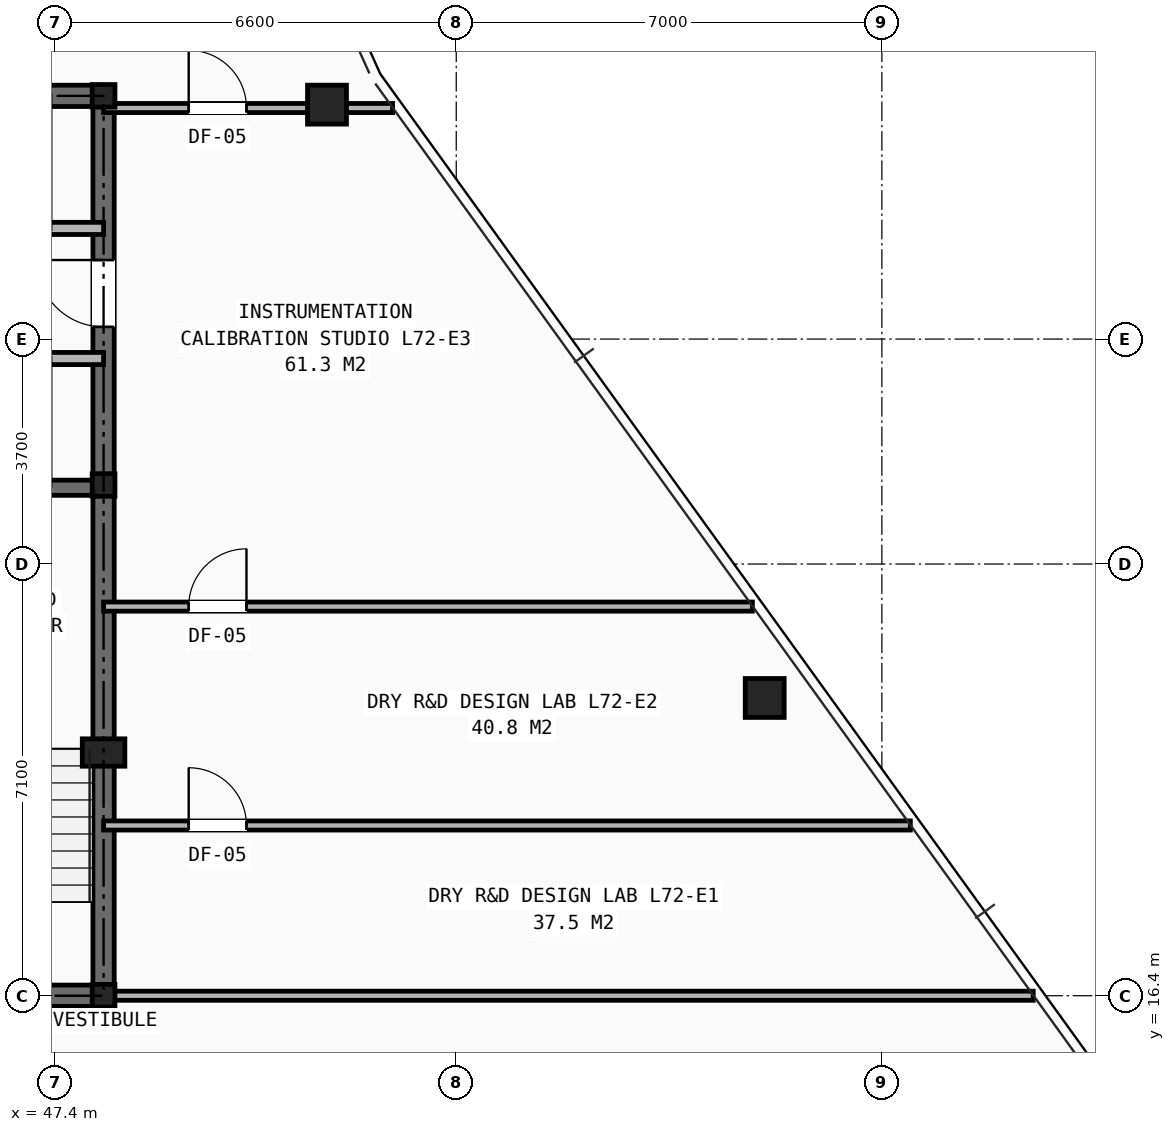
"""IFC4 building model, lengths in metres.
Left out: names, types, materials, properties, quantities, classifications, styles, units other than length and angle.
Written with IfcOpenShell. Run it as: python <this file> out.ifc"""

import sys

from ifc_helpers import new_model, si_unit, direction, frame, frame_2d, origin, origin_2d, place, context, subcontext, project, spatial, rectangle, hollow_rectangle, i_section, extrude, element, fill, save


model = new_model("IFC4")
c1 = context("Model", 3, precision=1e-05, world=origin(), true_north=direction((0.0, 1.0)))
c2 = subcontext(c1, "Body", "Model", "MODEL_VIEW")
j1 = project(units=[si_unit("LENGTHUNIT", "METRE"), si_unit("PLANEANGLEUNIT", "RADIAN")], contexts=[c1])
p1 = place(None, origin())
s1 = spatial("IfcSite", under=j1, at=p1, CompositionType="ELEMENT")
p2 = place(p1, origin())
s2 = spatial("IfcBuilding", under=s1, at=p2, CompositionType="ELEMENT")
p3 = place(p2, frame((0.0, 0.0, 255.0)))
s3 = spatial("IfcBuildingStorey", under=s2, at=p3, CompositionType="ELEMENT", Elevation=255.0)
for number, where, z_axis, x_axis in (
    (1, (48.2, 16.4, 0.0), (0.0, 0.0, 1.0), (1.0, 0.0, 0.0)),
    (2, (48.2, 24.8, 0.0), (0.0, 0.0, 1.0), (1.0, 0.0, 0.0)),
    (3, (48.2, 31.2, 0.0), (0.0, 0.0, 1.0), (1.0, 0.0, 0.0)),
):
    element("IfcColumn", number, at=place(p3, frame(where, z_axis=z_axis, x_axis=x_axis)), inside=s3, PredefinedType="COLUMN", context=c2, shape_type="SweptSolid", body=[
        extrude(i_section(OverallWidth=0.374, OverallDepth=0.372, WebThickness=0.016, FlangeThickness=0.026, at=origin_2d()), origin(), (0.0, 0.0, 1.0), 3.5),
    ])
p4 = place(p3, frame((48.2, 20.4, 0.0), z_axis=(0.0, 0.0, 1.0), x_axis=(1.0, 0.0, 0.0)))
e4 = element("IfcColumn", 4, at=p4, inside=s3, PredefinedType="PILASTER", context=c2, shape_type="SweptSolid", body=[
    extrude(rectangle(XDim=0.7, YDim=0.45, at=origin_2d()), origin(), (0.0, 0.0, 1.0), 3.5),
])
for number, where, z_axis, x_axis in (
    (5, (59.073, 21.297, 0.0), (0.0, 0.0, 1.0), (1.0, 0.0, 0.0)),
    (6, (51.874, 31.056, 0.0), (0.0, 0.0, 1.0), (1.0, 0.0, 0.0)),
):
    element("IfcColumn", number, at=place(p3, frame(where, z_axis=z_axis, x_axis=x_axis)), inside=s3, PredefinedType="COLUMN", context=c2, shape_type="SweptSolid", body=[
        extrude(hollow_rectangle(XDim=0.64, YDim=0.64, WallThickness=0.045, at=origin_2d()), origin(), (0.0, 0.0, 1.0), 3.5),
    ])
p5 = place(p3, frame((31.8, 16.4, 0.0), z_axis=(0.0, 0.0, 1.0), x_axis=(1.0, 0.0, 0.0)))
e7 = element("IfcWall", 7, at=p5, inside=s3, PredefinedType="SHEAR", context=c2, shape_type="SweptSolid", body=[
    extrude(rectangle(XDim=16.4, YDim=0.35, at=frame_2d((8.2, 0.0))), origin(), (0.0, 0.0, 1.0), 3.25),
])
p6 = place(p5, frame((7.75, 0.0, 0.0)))
e8 = element("IfcOpeningElement", 8, at=p6, cuts=e7, PredefinedType="OPENING", context=c2, shape_type="SweptSolid", body=[
    extrude(rectangle(XDim=0.9, YDim=2.1, at=frame_2d((0.45, 1.05))), frame((0.0, 0.185, 0.0), z_axis=(0.0, -1.0, 0.0), x_axis=(1.0, 0.0, 0.0)), (0.0, 0.0, 1.0), 0.37),
])
p7 = place(p5, frame((4.2, 0.0, 0.0)))
e9 = element("IfcOpeningElement", 9, at=p7, cuts=e7, PredefinedType="OPENING", context=c2, shape_type="SweptSolid", body=[
    extrude(rectangle(XDim=0.95, YDim=2.1, at=frame_2d((0.475, 1.05))), frame((0.0, 0.185, 0.0), z_axis=(0.0, -1.0, 0.0), x_axis=(1.0, 0.0, 0.0)), (0.0, 0.0, 1.0), 0.37),
])
p8 = place(p5, frame((10.6, 0.0, 0.0)))
e10 = element("IfcOpeningElement", 10, at=p8, cuts=e7, PredefinedType="OPENING", context=c2, shape_type="SweptSolid", body=[
    extrude(rectangle(XDim=0.95, YDim=2.1, at=frame_2d((0.475, 1.05))), frame((0.0, 0.185, 0.0), z_axis=(0.0, -1.0, 0.0), x_axis=(1.0, 0.0, 0.0)), (0.0, 0.0, 1.0), 0.37),
])
p9 = place(p3, frame((31.8, 31.2, 0.0), z_axis=(0.0, 0.0, 1.0), x_axis=(1.0, 0.0, 0.0)))
e11 = element("IfcWall", 11, at=p9, inside=s3, PredefinedType="SHEAR", context=c2, shape_type="SweptSolid", body=[
    extrude(rectangle(XDim=16.4, YDim=0.35, at=frame_2d((8.2, 0.0))), origin(), (0.0, 0.0, 1.0), 3.25),
])
p10 = place(p3, frame((48.2, 16.4, 0.0), z_axis=(0.0, 0.0, 1.0), x_axis=(0.0, 1.0, 0.0)))
e12 = element("IfcWall", 12, at=p10, inside=s3, PredefinedType="SHEAR", context=c2, shape_type="SweptSolid", body=[
    extrude(rectangle(XDim=14.8, YDim=0.35, at=frame_2d((7.4, 0.0))), origin(), (0.0, 0.0, 1.0), 3.25),
])
p11 = place(p10, frame((11.0, 0.0, 0.0)))
e13 = element("IfcOpeningElement", 13, at=p11, cuts=e12, PredefinedType="OPENING", context=c2, shape_type="SweptSolid", body=[
    extrude(rectangle(XDim=1.1, YDim=2.15, at=frame_2d((0.55, 1.075))), frame((0.0, 0.185, 0.0), z_axis=(0.0, -1.0, 0.0), x_axis=(1.0, 0.0, 0.0)), (0.0, 0.0, 1.0), 0.37),
])
p12 = place(p3, frame((44.955, 24.755, 0.0), z_axis=(0.0, 0.0, 1.0), x_axis=(1.0, 0.0, 0.0)))
e14 = element("IfcWall", 14, at=p12, inside=s3, PredefinedType="SHEAR", context=c2, shape_type="SweptSolid", body=[
    extrude(rectangle(XDim=3.245, YDim=0.25, at=frame_2d((1.623, 0.0))), origin(), (0.0, 0.0, 1.0), 3.25),
])
p13 = place(p3, frame((31.8, 29.02, 0.0), z_axis=(0.0, 0.0, 1.0), x_axis=(1.0, 0.0, 0.0)))
e15 = element("IfcWall", 15, at=p13, inside=s3, PredefinedType="SOLIDWALL", context=c2, shape_type="SweptSolid", body=[
    extrude(rectangle(XDim=16.4, YDim=0.2, at=frame_2d((8.2, 0.0))), origin(), (0.0, 0.0, 1.0), 2.705),
])
p14 = place(p13, frame((0.55, 0.0, 0.0)))
e16 = element("IfcOpeningElement", 16, at=p14, cuts=e15, PredefinedType="OPENING", context=c2, shape_type="SweptSolid", body=[
    extrude(rectangle(XDim=0.85, YDim=2.05, at=frame_2d((0.425, 1.025))), frame((0.0, 0.11, 0.0), z_axis=(0.0, -1.0, 0.0), x_axis=(1.0, 0.0, 0.0)), (0.0, 0.0, 1.0), 0.22),
])
p15 = place(p13, frame((5.94, 0.0, 0.0)))
e17 = element("IfcOpeningElement", 17, at=p15, cuts=e15, PredefinedType="OPENING", context=c2, shape_type="SweptSolid", body=[
    extrude(rectangle(XDim=0.9, YDim=2.1, at=frame_2d((0.45, 1.05))), frame((0.0, 0.11, 0.0), z_axis=(0.0, -1.0, 0.0), x_axis=(1.0, 0.0, 0.0)), (0.0, 0.0, 1.0), 0.22),
])
p16 = place(p13, frame((11.41, 0.0, 0.0)))
e18 = element("IfcOpeningElement", 18, at=p16, cuts=e15, PredefinedType="OPENING", context=c2, shape_type="SweptSolid", body=[
    extrude(rectangle(XDim=1.1, YDim=2.15, at=frame_2d((0.55, 1.075))), frame((0.0, 0.11, 0.0), z_axis=(0.0, -1.0, 0.0), x_axis=(1.0, 0.0, 0.0)), (0.0, 0.0, 1.0), 0.22),
])
p17 = place(p13, frame((13.73, 0.0, 0.0)))
e19 = element("IfcOpeningElement", 19, at=p17, cuts=e15, PredefinedType="OPENING", context=c2, shape_type="SweptSolid", body=[
    extrude(rectangle(XDim=1.1, YDim=2.15, at=frame_2d((0.55, 1.075))), frame((0.0, 0.11, 0.0), z_axis=(0.0, -1.0, 0.0), x_axis=(1.0, 0.0, 0.0)), (0.0, 0.0, 1.0), 0.22),
])
p18 = place(p3, frame((31.8, 26.88, 0.0), z_axis=(0.0, 0.0, 1.0), x_axis=(1.0, 0.0, 0.0)))
e20 = element("IfcWall", 20, at=p18, inside=s3, PredefinedType="SOLIDWALL", context=c2, shape_type="SweptSolid", body=[
    extrude(rectangle(XDim=16.4, YDim=0.2, at=frame_2d((8.2, 0.0))), origin(), (0.0, 0.0, 1.0), 2.705),
])
p19 = place(p18, frame((0.55, 0.0, 0.0)))
e21 = element("IfcOpeningElement", 21, at=p19, cuts=e20, PredefinedType="OPENING", context=c2, shape_type="SweptSolid", body=[
    extrude(rectangle(XDim=0.85, YDim=2.05, at=frame_2d((0.425, 1.025))), frame((0.0, 0.11, 0.0), z_axis=(0.0, -1.0, 0.0), x_axis=(1.0, 0.0, 0.0)), (0.0, 0.0, 1.0), 0.22),
])
p20 = place(p18, frame((5.94, 0.0, 0.0)))
e22 = element("IfcOpeningElement", 22, at=p20, cuts=e20, PredefinedType="OPENING", context=c2, shape_type="SweptSolid", body=[
    extrude(rectangle(XDim=0.9, YDim=2.1, at=frame_2d((0.45, 1.05))), frame((0.0, 0.11, 0.0), z_axis=(0.0, -1.0, 0.0), x_axis=(1.0, 0.0, 0.0)), (0.0, 0.0, 1.0), 0.22),
])
p21 = place(p18, frame((11.41, 0.0, 0.0)))
e23 = element("IfcOpeningElement", 23, at=p21, cuts=e20, PredefinedType="OPENING", context=c2, shape_type="SweptSolid", body=[
    extrude(rectangle(XDim=1.1, YDim=2.15, at=frame_2d((0.55, 1.075))), frame((0.0, 0.11, 0.0), z_axis=(0.0, -1.0, 0.0), x_axis=(1.0, 0.0, 0.0)), (0.0, 0.0, 1.0), 0.22),
])
p22 = place(p18, frame((13.73, 0.0, 0.0)))
e24 = element("IfcOpeningElement", 24, at=p22, cuts=e20, PredefinedType="OPENING", context=c2, shape_type="SweptSolid", body=[
    extrude(rectangle(XDim=1.1, YDim=2.15, at=frame_2d((0.55, 1.075))), frame((0.0, 0.11, 0.0), z_axis=(0.0, -1.0, 0.0), x_axis=(1.0, 0.0, 0.0)), (0.0, 0.0, 1.0), 0.22),
])
p23 = place(p3, frame((48.2, 16.4, 0.0), z_axis=(0.0, 0.0, 1.0), x_axis=(1.0, 0.0, 0.0)))
e25 = element("IfcWall", 25, at=p23, inside=s3, PredefinedType="PARTITIONING", context=c2, shape_type="SweptSolid", body=[
    extrude(rectangle(XDim=15.289, YDim=0.15, at=frame_2d((7.644, 0.0))), origin(), (0.0, 0.0, 1.0), 2.292),
])
p24 = place(p3, frame((48.2, 19.2, 0.0), z_axis=(0.0, 0.0, 1.0), x_axis=(1.0, 0.0, 0.0)))
e26 = element("IfcWall", 26, at=p24, inside=s3, PredefinedType="PARTITIONING", context=c2, shape_type="SweptSolid", body=[
    extrude(rectangle(XDim=13.268, YDim=0.15, at=frame_2d((6.634, 0.0))), origin(), (0.0, 0.0, 1.0), 2.292),
])
p25 = place(p24, frame((1.4, 0.0, 0.0)))
e27 = element("IfcOpeningElement", 27, at=p25, cuts=e26, PredefinedType="OPENING", context=c2, shape_type="SweptSolid", body=[
    extrude(rectangle(XDim=0.95, YDim=2.1, at=frame_2d((0.475, 1.05))), frame((0.0, 0.085, 0.0), z_axis=(0.0, -1.0, 0.0), x_axis=(1.0, 0.0, 0.0)), (0.0, 0.0, 1.0), 0.17),
])
p26 = place(p3, frame((48.2, 22.8, 0.0), z_axis=(0.0, 0.0, 1.0), x_axis=(1.0, 0.0, 0.0)))
e28 = element("IfcWall", 28, at=p26, inside=s3, PredefinedType="PARTITIONING", context=c2, shape_type="SweptSolid", body=[
    extrude(rectangle(XDim=10.67, YDim=0.15, at=frame_2d((5.335, 0.0))), origin(), (0.0, 0.0, 1.0), 2.628),
])
p27 = place(p26, frame((1.4, 0.0, 0.0)))
e29 = element("IfcOpeningElement", 29, at=p27, cuts=e28, PredefinedType="OPENING", context=c2, shape_type="SweptSolid", body=[
    extrude(rectangle(XDim=0.95, YDim=2.1, at=frame_2d((0.475, 1.05))), frame((0.0, 0.085, 0.0), z_axis=(0.0, -1.0, 0.0), x_axis=(1.0, 0.0, 0.0)), (0.0, 0.0, 1.0), 0.17),
])
p28 = place(p3, frame((48.2, 31.0, 0.0), z_axis=(0.0, 0.0, 1.0), x_axis=(1.0, 0.0, 0.0)))
e30 = element("IfcWall", 30, at=p28, inside=s3, PredefinedType="PARTITIONING", context=c2, shape_type="SweptSolid", body=[
    extrude(rectangle(XDim=4.752, YDim=0.15, at=frame_2d((2.376, 0.0))), origin(), (0.0, 0.0, 1.0), 2.292),
])
p29 = place(p28, frame((1.4, 0.0, 0.0)))
e31 = element("IfcOpeningElement", 31, at=p29, cuts=e30, PredefinedType="OPENING", context=c2, shape_type="SweptSolid", body=[
    extrude(rectangle(XDim=0.95, YDim=2.1, at=frame_2d((0.475, 1.05))), frame((0.0, 0.085, 0.0), z_axis=(0.0, -1.0, 0.0), x_axis=(1.0, 0.0, 0.0)), (0.0, 0.0, 1.0), 0.17),
])
p30 = place(p11, origin())
e32 = element("IfcDoor", 32, at=p30, inside=s3, OperationType="SINGLE_SWING_RIGHT", PredefinedType="DOOR", context=c2, shape_type="SweptSolid", body=[
    extrude(rectangle(XDim=1.1, YDim=2.15, at=frame_2d((0.55, 1.075))), frame((0.0, 0.025, 0.0), z_axis=(0.0, -1.0, 0.0), x_axis=(1.0, 0.0, 0.0)), (0.0, 0.0, 1.0), 0.05),
])
fill(e13, e32)
p31 = place(p25, origin())
e33 = element("IfcDoor", 33, at=p31, inside=s3, OperationType="SINGLE_SWING_LEFT", PredefinedType="DOOR", context=c2, shape_type="SweptSolid", body=[
    extrude(rectangle(XDim=0.95, YDim=2.1, at=frame_2d((0.475, 1.05))), frame((0.0, 0.025, 0.0), z_axis=(0.0, -1.0, 0.0), x_axis=(1.0, 0.0, 0.0)), (0.0, 0.0, 1.0), 0.05),
])
fill(e27, e33)
p32 = place(p27, origin())
e34 = element("IfcDoor", 34, at=p32, inside=s3, OperationType="SINGLE_SWING_RIGHT", PredefinedType="DOOR", context=c2, shape_type="SweptSolid", body=[
    extrude(rectangle(XDim=0.95, YDim=2.1, at=frame_2d((0.475, 1.05))), frame((0.0, 0.025, 0.0), z_axis=(0.0, -1.0, 0.0), x_axis=(1.0, 0.0, 0.0)), (0.0, 0.0, 1.0), 0.05),
])
fill(e29, e34)
p33 = place(p29, origin())
e35 = element("IfcDoor", 35, at=p33, inside=s3, OperationType="SINGLE_SWING_LEFT", PredefinedType="DOOR", context=c2, shape_type="SweptSolid", body=[
    extrude(rectangle(XDim=0.95, YDim=2.1, at=frame_2d((0.475, 1.05))), frame((0.0, 0.025, 0.0), z_axis=(0.0, -1.0, 0.0), x_axis=(1.0, 0.0, 0.0)), (0.0, 0.0, 1.0), 0.05),
])
fill(e31, e35)
save(model, sys.argv[1])
